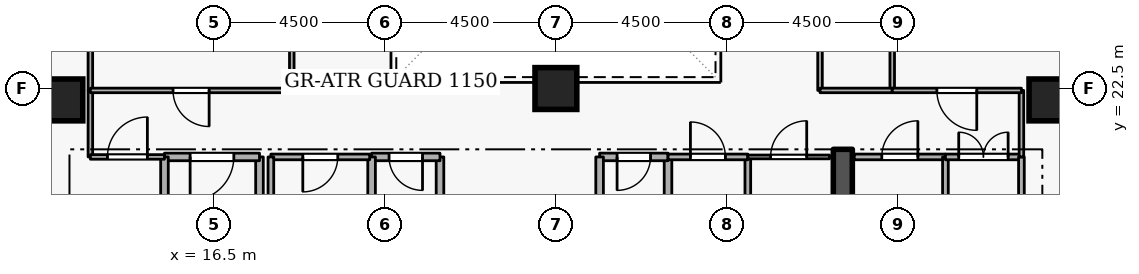
"""IFC4 building model, lengths in metres.
Left out: names, types, materials, properties, quantities, classifications, styles, units other than length and angle.
Written with IfcOpenShell. Run it as: python <this file> out.ifc"""

import sys

from ifc_helpers import new_model, si_unit, direction, frame, frame_2d, origin, origin_2d, place, context, subcontext, project, spatial, rectangle, extrude, element, fill, save


model = new_model("IFC4")
c1 = context("Model", 3, precision=1e-05, world=origin(), true_north=direction((0.0, 1.0)))
c2 = subcontext(c1, "Body", "Model", "MODEL_VIEW")
j1 = project(units=[si_unit("LENGTHUNIT", "METRE"), si_unit("PLANEANGLEUNIT", "RADIAN")], contexts=[c1])
p1 = place(None, origin())
s1 = spatial("IfcSite", under=j1, at=p1, CompositionType="ELEMENT")
p2 = place(p1, origin())
s2 = spatial("IfcBuilding", under=s1, at=p2, CompositionType="ELEMENT")
p3 = place(p2, frame((0.0, 0.0, 167.1)))
s3 = spatial("IfcBuildingStorey", under=s2, at=p3, CompositionType="ELEMENT", Elevation=167.1)
p4 = place(p3, frame((33.05, 15.1, 0.0), z_axis=(0.0, 0.0, 1.0), x_axis=(0.0, 1.0, 0.0)))
e1 = element("IfcWall", 1, at=p4, inside=s3, PredefinedType="SHEAR", context=c2, shape_type="SweptSolid", body=[
    extrude(rectangle(XDim=5.8, YDim=0.5, at=frame_2d((2.9, 0.0))), origin(), (0.0, 0.0, 1.0), 3.6),
])
for number, where, z_axis, x_axis in (
    (2, (12.5, 22.2, 0.0), (0.0, 0.0, 1.0), (1.0, 0.0, 0.0)),
    (3, (38.5, 22.2, 0.0), (0.0, 0.0, 1.0), (1.0, 0.0, 0.0)),
    (4, (25.5, 22.5, 0.0), (0.0, 0.0, 1.0), (1.0, 0.0, 0.0)),
):
    element("IfcColumn", number, at=place(p3, frame(where, z_axis=z_axis, x_axis=x_axis)), inside=s3, PredefinedType="COLUMN", context=c2, shape_type="SweptSolid", body=[
        extrude(rectangle(XDim=1.1, YDim=1.1, at=origin_2d()), origin(), (0.0, 0.0, 1.0), 3.6),
    ])
p5 = place(p3, frame((17.7, 18.4, 0.0), z_axis=(0.0, 0.0, 1.0), x_axis=(0.0, 1.0, 0.0)))
e5 = element("IfcWall", 5, at=p5, inside=s3, PredefinedType="STANDARD", context=c2, shape_type="SweptSolid", body=[
    extrude(rectangle(XDim=2.3, YDim=0.2, at=frame_2d((1.15, 0.0))), origin(), (0.0, 0.0, 1.0), 2.545),
])
p6 = place(p3, frame((17.7, 20.7, 0.0), z_axis=(0.0, 0.0, 1.0), x_axis=(-1.0, 0.0, 0.0)))
e6 = element("IfcWall", 6, at=p6, inside=s3, PredefinedType="STANDARD", context=c2, shape_type="SweptSolid", body=[
    extrude(rectangle(XDim=2.5, YDim=0.2, at=frame_2d((1.25, 0.0))), origin(), (0.0, 0.0, 1.0), 3.34),
])
p7 = place(p6, frame((0.675, 0.0, 0.0)))
e7 = element("IfcOpeningElement", 7, at=p7, cuts=e6, PredefinedType="OPENING", context=c2, shape_type="SweptSolid", body=[
    extrude(rectangle(XDim=1.15, YDim=2.1, at=frame_2d((0.575, 1.05))), frame((0.0, 0.11, 0.0), z_axis=(0.0, -1.0, 0.0), x_axis=(1.0, 0.0, 0.0)), (0.0, 0.0, 1.0), 0.22),
])
p8 = place(p3, frame((15.2, 20.7, 0.0), z_axis=(0.0, 0.0, 1.0), x_axis=(0.0, -1.0, 0.0)))
e8 = element("IfcWall", 8, at=p8, inside=s3, PredefinedType="STANDARD", context=c2, shape_type="SweptSolid", body=[
    extrude(rectangle(XDim=5.7, YDim=0.2, at=frame_2d((2.85, 0.0))), origin(), (0.0, 0.0, 1.0), 3.34),
])
p9 = place(p3, frame((28.45, 18.65, 0.0), z_axis=(0.0, 0.0, 1.0), x_axis=(0.0, 1.0, 0.0)))
e9 = element("IfcWall", 9, at=p9, inside=s3, PredefinedType="STANDARD", context=c2, shape_type="SweptSolid", body=[
    extrude(rectangle(XDim=2.05, YDim=0.2, at=frame_2d((1.025, 0.0))), origin(), (0.0, 0.0, 1.0), 3.34),
])
p10 = place(p3, frame((28.45, 20.7, 0.0), z_axis=(0.0, 0.0, 1.0), x_axis=(-1.0, 0.0, 0.0)))
e10 = element("IfcWall", 10, at=p10, inside=s3, PredefinedType="STANDARD", context=c2, shape_type="SweptSolid", body=[
    extrude(rectangle(XDim=1.8, YDim=0.2, at=frame_2d((0.9, 0.0))), origin(), (0.0, 0.0, 1.0), 3.34),
])
p11 = place(p10, frame((0.46, 0.0, 0.0)))
e11 = element("IfcOpeningElement", 11, at=p11, cuts=e10, PredefinedType="OPENING", context=c2, shape_type="SweptSolid", body=[
    extrude(rectangle(XDim=0.88, YDim=2.04, at=frame_2d((0.44, 1.02))), frame((0.0, 0.11, 0.0), z_axis=(0.0, -1.0, 0.0), x_axis=(1.0, 0.0, 0.0)), (0.0, 0.0, 1.0), 0.22),
])
for number, where, z_axis, x_axis in (
    (12, (26.65, 20.7, 0.0), (0.0, 0.0, 1.0), (0.0, -1.0, 0.0)),
    (13, (22.45, 18.65, 0.0), (0.0, 0.0, 1.0), (0.0, 1.0, 0.0)),
):
    element("IfcWall", number, at=place(p3, frame(where, z_axis=z_axis, x_axis=x_axis)), inside=s3, PredefinedType="STANDARD", context=c2, shape_type="SweptSolid", body=[
        extrude(rectangle(XDim=2.05, YDim=0.2, at=frame_2d((1.025, 0.0))), origin(), (0.0, 0.0, 1.0), 3.34),
    ])
p12 = place(p3, frame((22.45, 20.7, 0.0), z_axis=(0.0, 0.0, 1.0), x_axis=(-1.0, 0.0, 0.0)))
e14 = element("IfcWall", 14, at=p12, inside=s3, PredefinedType="STANDARD", context=c2, shape_type="SweptSolid", body=[
    extrude(rectangle(XDim=1.8, YDim=0.2, at=frame_2d((0.9, 0.0))), origin(), (0.0, 0.0, 1.0), 3.34),
])
p13 = place(p12, frame((0.46, 0.0, 0.0)))
e15 = element("IfcOpeningElement", 15, at=p13, cuts=e14, PredefinedType="OPENING", context=c2, shape_type="SweptSolid", body=[
    extrude(rectangle(XDim=0.88, YDim=2.04, at=frame_2d((0.44, 1.02))), frame((0.0, 0.11, 0.0), z_axis=(0.0, -1.0, 0.0), x_axis=(1.0, 0.0, 0.0)), (0.0, 0.0, 1.0), 0.22),
])
p14 = place(p3, frame((20.65, 20.7, 0.0), z_axis=(0.0, 0.0, 1.0), x_axis=(0.0, -1.0, 0.0)))
e16 = element("IfcWall", 16, at=p14, inside=s3, PredefinedType="STANDARD", context=c2, shape_type="SweptSolid", body=[
    extrude(rectangle(XDim=2.05, YDim=0.2, at=frame_2d((1.025, 0.0))), origin(), (0.0, 0.0, 1.0), 3.34),
])
p15 = place(p3, frame((20.6, 20.7, 0.0), z_axis=(0.0, 0.0, 1.0), x_axis=(-1.0, 0.0, 0.0)))
e17 = element("IfcWall", 17, at=p15, inside=s3, PredefinedType="PARTITIONING", context=c2, shape_type="SweptSolid", body=[
    extrude(rectangle(XDim=2.6, YDim=0.15, at=frame_2d((1.3, 0.0))), origin(), (0.0, 0.0, 1.0), 3.34),
])
p16 = place(p15, frame((0.84, 0.0, 0.0)))
e18 = element("IfcOpeningElement", 18, at=p16, cuts=e17, PredefinedType="OPENING", context=c2, shape_type="SweptSolid", body=[
    extrude(rectangle(XDim=0.92, YDim=2.08, at=frame_2d((0.46, 1.04))), frame((0.0, 0.085, 0.0), z_axis=(0.0, -1.0, 0.0), x_axis=(1.0, 0.0, 0.0)), (0.0, 0.0, 1.0), 0.17),
])
p17 = place(p3, frame((18.0, 20.7, 0.0), z_axis=(0.0, 0.0, 1.0), x_axis=(0.0, -1.0, 0.0)))
e19 = element("IfcWall", 19, at=p17, inside=s3, PredefinedType="PARTITIONING", context=c2, shape_type="SweptSolid", body=[
    extrude(rectangle(XDim=2.05, YDim=0.15, at=frame_2d((1.025, 0.0))), origin(), (0.0, 0.0, 1.0), 2.545),
])
p18 = place(p3, frame((30.55, 20.7, 0.0), z_axis=(0.0, 0.0, 1.0), x_axis=(0.0, -1.0, 0.0)))
e20 = element("IfcWall", 20, at=p18, inside=s3, PredefinedType="PARTITIONING", context=c2, shape_type="SweptSolid", body=[
    extrude(rectangle(XDim=2.05, YDim=0.15, at=frame_2d((1.025, 0.0))), origin(), (0.0, 0.0, 1.0), 3.34),
])
p19 = place(p3, frame((28.45, 20.7, 0.0), z_axis=(0.0, 0.0, 1.0), x_axis=(1.0, 0.0, 0.0)))
e21 = element("IfcWall", 21, at=p19, inside=s3, PredefinedType="PARTITIONING", context=c2, shape_type="SweptSolid", body=[
    extrude(rectangle(XDim=2.1, YDim=0.15, at=frame_2d((1.05, 0.0))), origin(), (0.0, 0.0, 1.0), 3.34),
])
p20 = place(p19, frame((0.59, 0.0, 0.0)))
e22 = element("IfcOpeningElement", 22, at=p20, cuts=e21, PredefinedType="OPENING", context=c2, shape_type="SweptSolid", body=[
    extrude(rectangle(XDim=0.92, YDim=2.08, at=frame_2d((0.46, 1.04))), frame((0.0, 0.085, 0.0), z_axis=(0.0, -1.0, 0.0), x_axis=(1.0, 0.0, 0.0)), (0.0, 0.0, 1.0), 0.17),
])
p21 = place(p3, frame((30.55, 20.7, 0.0), z_axis=(0.0, 0.0, 1.0), x_axis=(1.0, 0.0, 0.0)))
e23 = element("IfcWall", 23, at=p21, inside=s3, PredefinedType="PARTITIONING", context=c2, shape_type="SweptSolid", body=[
    extrude(rectangle(XDim=2.15, YDim=0.1, at=frame_2d((1.075, 0.0))), origin(), (0.0, 0.0, 1.0), 3.34),
])
p22 = place(p21, frame((0.6, 0.0, 0.0)))
e24 = element("IfcOpeningElement", 24, at=p22, cuts=e23, PredefinedType="OPENING", context=c2, shape_type="SweptSolid", body=[
    extrude(rectangle(XDim=0.95, YDim=2.1, at=frame_2d((0.475, 1.05))), frame((0.0, 0.06, 0.0), z_axis=(0.0, -1.0, 0.0), x_axis=(1.0, 0.0, 0.0)), (0.0, 0.0, 1.0), 0.12),
])
p23 = place(p3, frame((33.35, 20.7, 0.0), z_axis=(0.0, 0.0, 1.0), x_axis=(1.0, 0.0, 0.0)))
e25 = element("IfcWall", 25, at=p23, inside=s3, PredefinedType="PARTITIONING", context=c2, shape_type="SweptSolid", body=[
    extrude(rectangle(XDim=2.4, YDim=0.15, at=frame_2d((1.2, 0.0))), origin(), (0.0, 0.0, 1.0), 3.34),
])
p24 = place(p23, frame((0.725, 0.0, 0.0)))
e26 = element("IfcOpeningElement", 26, at=p24, cuts=e25, PredefinedType="OPENING", context=c2, shape_type="SweptSolid", body=[
    extrude(rectangle(XDim=0.95, YDim=2.1, at=frame_2d((0.475, 1.05))), frame((0.0, 0.085, 0.0), z_axis=(0.0, -1.0, 0.0), x_axis=(1.0, 0.0, 0.0)), (0.0, 0.0, 1.0), 0.17),
])
p25 = place(p3, frame((35.75, 20.7, 0.0), z_axis=(0.0, 0.0, 1.0), x_axis=(0.0, -1.0, 0.0)))
e27 = element("IfcWall", 27, at=p25, inside=s3, PredefinedType="PARTITIONING", context=c2, shape_type="SweptSolid", body=[
    extrude(rectangle(XDim=5.65, YDim=0.15, at=frame_2d((2.825, 0.0))), origin(), (0.0, 0.0, 1.0), 3.34),
])
p26 = place(p3, frame((35.75, 20.7, 0.0), z_axis=(0.0, 0.0, 1.0), x_axis=(1.0, 0.0, 0.0)))
e28 = element("IfcWall", 28, at=p26, inside=s3, PredefinedType="PARTITIONING", context=c2, shape_type="SweptSolid", body=[
    extrude(rectangle(XDim=2.0, YDim=0.15, at=frame_2d((1.0, 0.0))), origin(), (0.0, 0.0, 1.0), 3.34),
])
p27 = place(p26, frame((0.35, 0.0, 0.0)))
e29 = element("IfcOpeningElement", 29, at=p27, cuts=e28, PredefinedType="OPENING", context=c2, shape_type="SweptSolid", body=[
    extrude(rectangle(XDim=1.3, YDim=2.12, at=frame_2d((0.65, 1.06))), frame((0.0, 0.085, 0.0), z_axis=(0.0, -1.0, 0.0), x_axis=(1.0, 0.0, 0.0)), (0.0, 0.0, 1.0), 0.17),
])
p28 = place(p3, frame((37.75, 20.7, 0.0), z_axis=(0.0, 0.0, 1.0), x_axis=(0.0, -1.0, 0.0)))
e30 = element("IfcWall", 30, at=p28, inside=s3, PredefinedType="PARTITIONING", context=c2, shape_type="SweptSolid", body=[
    extrude(rectangle(XDim=5.65, YDim=0.15, at=frame_2d((2.825, 0.0))), origin(), (0.0, 0.0, 1.0), 3.34),
])
p29 = place(p3, frame((13.25, 27.0, 0.0), z_axis=(0.0, 0.0, 1.0), x_axis=(0.0, -1.0, 0.0)))
e31 = element("IfcWall", 31, at=p29, inside=s3, PredefinedType="PARTITIONING", context=c2, shape_type="SweptSolid", body=[
    extrude(rectangle(XDim=4.55, YDim=0.12, at=frame_2d((2.275, 0.0))), origin(), (0.0, 0.0, 1.0), 3.34),
])
p30 = place(p3, frame((13.25, 22.45, 0.0), z_axis=(0.0, 0.0, 1.0), x_axis=(0.0, -1.0, 0.0)))
e32 = element("IfcWall", 32, at=p30, inside=s3, PredefinedType="PARTITIONING", context=c2, shape_type="SweptSolid", body=[
    extrude(rectangle(XDim=1.75, YDim=0.12, at=frame_2d((0.875, 0.0))), origin(), (0.0, 0.0, 1.0), 3.34),
])
p31 = place(p3, frame((13.25, 20.7, 0.0), z_axis=(0.0, 0.0, 1.0), x_axis=(1.0, 0.0, 0.0)))
e33 = element("IfcWall", 33, at=p31, inside=s3, PredefinedType="PARTITIONING", context=c2, shape_type="SweptSolid", body=[
    extrude(rectangle(XDim=1.95, YDim=0.12, at=frame_2d((0.975, 0.0))), origin(), (0.0, 0.0, 1.0), 3.34),
])
p32 = place(p31, frame((0.45, 0.0, 0.0)))
e34 = element("IfcOpeningElement", 34, at=p32, cuts=e33, PredefinedType="OPENING", context=c2, shape_type="SweptSolid", body=[
    extrude(rectangle(XDim=1.05, YDim=2.1, at=frame_2d((0.525, 1.05))), frame((0.0, 0.07, 0.0), z_axis=(0.0, -1.0, 0.0), x_axis=(1.0, 0.0, 0.0)), (0.0, 0.0, 1.0), 0.14),
])
p33 = place(p3, frame((18.55, 27.0, 0.0), z_axis=(0.0, 0.0, 1.0), x_axis=(0.0, -1.0, 0.0)))
e35 = element("IfcWall", 35, at=p33, inside=s3, PredefinedType="PARTITIONING", context=c2, shape_type="SweptSolid", body=[
    extrude(rectangle(XDim=4.55, YDim=0.12, at=frame_2d((2.275, 0.0))), origin(), (0.0, 0.0, 1.0), 3.34),
])
p34 = place(p3, frame((18.55, 22.45, 0.0), z_axis=(0.0, 0.0, 1.0), x_axis=(-1.0, 0.0, 0.0)))
e36 = element("IfcWall", 36, at=p34, inside=s3, PredefinedType="PARTITIONING", context=c2, shape_type="SweptSolid", body=[
    extrude(rectangle(XDim=5.3, YDim=0.12, at=frame_2d((2.65, 0.0))), origin(), (0.0, 0.0, 1.0), 3.34),
])
p35 = place(p34, frame((2.175, 0.0, 0.0)))
e37 = element("IfcOpeningElement", 37, at=p35, cuts=e36, PredefinedType="OPENING", context=c2, shape_type="SweptSolid", body=[
    extrude(rectangle(XDim=0.95, YDim=2.1, at=frame_2d((0.475, 1.05))), frame((0.0, 0.07, 0.0), z_axis=(0.0, -1.0, 0.0), x_axis=(1.0, 0.0, 0.0)), (0.0, 0.0, 1.0), 0.14),
])
p36 = place(p3, frame((32.45, 22.45, 0.0), z_axis=(0.0, 0.0, 1.0), x_axis=(0.0, 1.0, 0.0)))
e38 = element("IfcWall", 38, at=p36, inside=s3, PredefinedType="PARTITIONING", context=c2, shape_type="SweptSolid", body=[
    extrude(rectangle(XDim=4.55, YDim=0.12, at=frame_2d((2.275, 0.0))), origin(), (0.0, 0.0, 1.0), 3.34),
])
p37 = place(p36, frame((1.8, 0.0, 0.0)))
e39 = element("IfcOpeningElement", 39, at=p37, cuts=e38, PredefinedType="OPENING", context=c2, shape_type="SweptSolid", body=[
    extrude(rectangle(XDim=0.95, YDim=2.1, at=frame_2d((0.475, 1.05))), frame((0.0, 0.07, 0.0), z_axis=(0.0, -1.0, 0.0), x_axis=(1.0, 0.0, 0.0)), (0.0, 0.0, 1.0), 0.14),
])
p38 = place(p3, frame((34.35, 27.0, 0.0), z_axis=(0.0, 0.0, 1.0), x_axis=(0.0, -1.0, 0.0)))
e40 = element("IfcWall", 40, at=p38, inside=s3, PredefinedType="PARTITIONING", context=c2, shape_type="SweptSolid", body=[
    extrude(rectangle(XDim=4.55, YDim=0.12, at=frame_2d((2.275, 0.0))), origin(), (0.0, 0.0, 1.0), 3.34),
])
p39 = place(p3, frame((34.35, 22.45, 0.0), z_axis=(0.0, 0.0, 1.0), x_axis=(-1.0, 0.0, 0.0)))
e41 = element("IfcWall", 41, at=p39, inside=s3, PredefinedType="PARTITIONING", context=c2, shape_type="SweptSolid", body=[
    extrude(rectangle(XDim=1.9, YDim=0.12, at=frame_2d((0.95, 0.0))), origin(), (0.0, 0.0, 1.0), 3.34),
])
p40 = place(p3, frame((37.75, 20.7, 0.0), z_axis=(0.0, 0.0, 1.0), x_axis=(0.0, 1.0, 0.0)))
e42 = element("IfcWall", 42, at=p40, inside=s3, PredefinedType="PARTITIONING", context=c2, shape_type="SweptSolid", body=[
    extrude(rectangle(XDim=1.75, YDim=0.12, at=frame_2d((0.875, 0.0))), origin(), (0.0, 0.0, 1.0), 3.34),
])
p41 = place(p3, frame((37.75, 22.45, 0.0), z_axis=(0.0, 0.0, 1.0), x_axis=(-1.0, 0.0, 0.0)))
e43 = element("IfcWall", 43, at=p41, inside=s3, PredefinedType="PARTITIONING", context=c2, shape_type="SweptSolid", body=[
    extrude(rectangle(XDim=3.4, YDim=0.12, at=frame_2d((1.7, 0.0))), origin(), (0.0, 0.0, 1.0), 3.34),
])
p42 = place(p41, frame((1.175, 0.0, 0.0)))
e44 = element("IfcOpeningElement", 44, at=p42, cuts=e43, PredefinedType="OPENING", context=c2, shape_type="SweptSolid", body=[
    extrude(rectangle(XDim=1.05, YDim=2.1, at=frame_2d((0.525, 1.05))), frame((0.0, 0.07, 0.0), z_axis=(0.0, -1.0, 0.0), x_axis=(1.0, 0.0, 0.0)), (0.0, 0.0, 1.0), 0.14),
])
p43 = place(p7, origin())
e45 = element("IfcDoor", 45, at=p43, inside=s3, OperationType="SINGLE_SWING_RIGHT", PredefinedType="DOOR", context=c2, shape_type="SweptSolid", body=[
    extrude(rectangle(XDim=1.15, YDim=2.1, at=frame_2d((0.575, 1.05))), frame((0.0, 0.025, 0.0), z_axis=(0.0, -1.0, 0.0), x_axis=(1.0, 0.0, 0.0)), (0.0, 0.0, 1.0), 0.05),
])
fill(e7, e45)
p44 = place(p11, origin())
e46 = element("IfcDoor", 46, at=p44, inside=s3, OperationType="SINGLE_SWING_RIGHT", PredefinedType="DOOR", context=c2, shape_type="SweptSolid", body=[
    extrude(rectangle(XDim=0.88, YDim=2.04, at=frame_2d((0.44, 1.02))), frame((0.0, 0.025, 0.0), z_axis=(0.0, -1.0, 0.0), x_axis=(1.0, 0.0, 0.0)), (0.0, 0.0, 1.0), 0.05),
])
fill(e11, e46)
p45 = place(p13, origin())
e47 = element("IfcDoor", 47, at=p45, inside=s3, OperationType="SINGLE_SWING_LEFT", PredefinedType="DOOR", context=c2, shape_type="SweptSolid", body=[
    extrude(rectangle(XDim=0.88, YDim=2.04, at=frame_2d((0.44, 1.02))), frame((0.0, 0.025, 0.0), z_axis=(0.0, -1.0, 0.0), x_axis=(1.0, 0.0, 0.0)), (0.0, 0.0, 1.0), 0.05),
])
fill(e15, e47)
p46 = place(p16, origin())
e48 = element("IfcDoor", 48, at=p46, inside=s3, OperationType="SINGLE_SWING_RIGHT", PredefinedType="DOOR", context=c2, shape_type="SweptSolid", body=[
    extrude(rectangle(XDim=0.92, YDim=2.08, at=frame_2d((0.46, 1.04))), frame((0.0, 0.025, 0.0), z_axis=(0.0, -1.0, 0.0), x_axis=(1.0, 0.0, 0.0)), (0.0, 0.0, 1.0), 0.05),
])
fill(e18, e48)
p47 = place(p20, origin())
e49 = element("IfcDoor", 49, at=p47, inside=s3, OperationType="SINGLE_SWING_LEFT", PredefinedType="DOOR", context=c2, shape_type="SweptSolid", body=[
    extrude(rectangle(XDim=0.92, YDim=2.08, at=frame_2d((0.46, 1.04))), frame((0.0, 0.025, 0.0), z_axis=(0.0, -1.0, 0.0), x_axis=(1.0, 0.0, 0.0)), (0.0, 0.0, 1.0), 0.05),
])
fill(e22, e49)
p48 = place(p22, origin())
e50 = element("IfcDoor", 50, at=p48, inside=s3, OperationType="SINGLE_SWING_RIGHT", PredefinedType="DOOR", context=c2, shape_type="SweptSolid", body=[
    extrude(rectangle(XDim=0.95, YDim=2.1, at=frame_2d((0.475, 1.05))), frame((0.0, 0.025, 0.0), z_axis=(0.0, -1.0, 0.0), x_axis=(1.0, 0.0, 0.0)), (0.0, 0.0, 1.0), 0.05),
])
fill(e24, e50)
p49 = place(p24, origin())
e51 = element("IfcDoor", 51, at=p49, inside=s3, OperationType="SINGLE_SWING_RIGHT", PredefinedType="DOOR", context=c2, shape_type="SweptSolid", body=[
    extrude(rectangle(XDim=0.95, YDim=2.1, at=frame_2d((0.475, 1.05))), frame((0.0, 0.025, 0.0), z_axis=(0.0, -1.0, 0.0), x_axis=(1.0, 0.0, 0.0)), (0.0, 0.0, 1.0), 0.05),
])
fill(e26, e51)
p50 = place(p27, origin())
e52 = element("IfcDoor", 52, at=p50, inside=s3, OperationType="DOUBLE_DOOR_SINGLE_SWING", PredefinedType="DOOR", context=c2, shape_type="SweptSolid", body=[
    extrude(rectangle(XDim=1.3, YDim=2.12, at=frame_2d((0.65, 1.06))), frame((0.0, 0.025, 0.0), z_axis=(0.0, -1.0, 0.0), x_axis=(1.0, 0.0, 0.0)), (0.0, 0.0, 1.0), 0.05),
])
fill(e29, e52)
p51 = place(p32, origin())
e53 = element("IfcDoor", 53, at=p51, inside=s3, OperationType="SINGLE_SWING_RIGHT", PredefinedType="DOOR", context=c2, shape_type="SweptSolid", body=[
    extrude(rectangle(XDim=1.05, YDim=2.1, at=frame_2d((0.525, 1.05))), frame((0.0, 0.025, 0.0), z_axis=(0.0, -1.0, 0.0), x_axis=(1.0, 0.0, 0.0)), (0.0, 0.0, 1.0), 0.05),
])
fill(e34, e53)
p52 = place(p35, origin())
e54 = element("IfcDoor", 54, at=p52, inside=s3, OperationType="SINGLE_SWING_LEFT", PredefinedType="DOOR", context=c2, shape_type="SweptSolid", body=[
    extrude(rectangle(XDim=0.95, YDim=2.1, at=frame_2d((0.475, 1.05))), frame((0.0, 0.025, 0.0), z_axis=(0.0, -1.0, 0.0), x_axis=(1.0, 0.0, 0.0)), (0.0, 0.0, 1.0), 0.05),
])
fill(e37, e54)
p53 = place(p42, origin())
e55 = element("IfcDoor", 55, at=p53, inside=s3, OperationType="SINGLE_SWING_LEFT", PredefinedType="DOOR", context=c2, shape_type="SweptSolid", body=[
    extrude(rectangle(XDim=1.05, YDim=2.1, at=frame_2d((0.525, 1.05))), frame((0.0, 0.025, 0.0), z_axis=(0.0, -1.0, 0.0), x_axis=(1.0, 0.0, 0.0)), (0.0, 0.0, 1.0), 0.05),
])
fill(e44, e55)
save(model, sys.argv[1])
